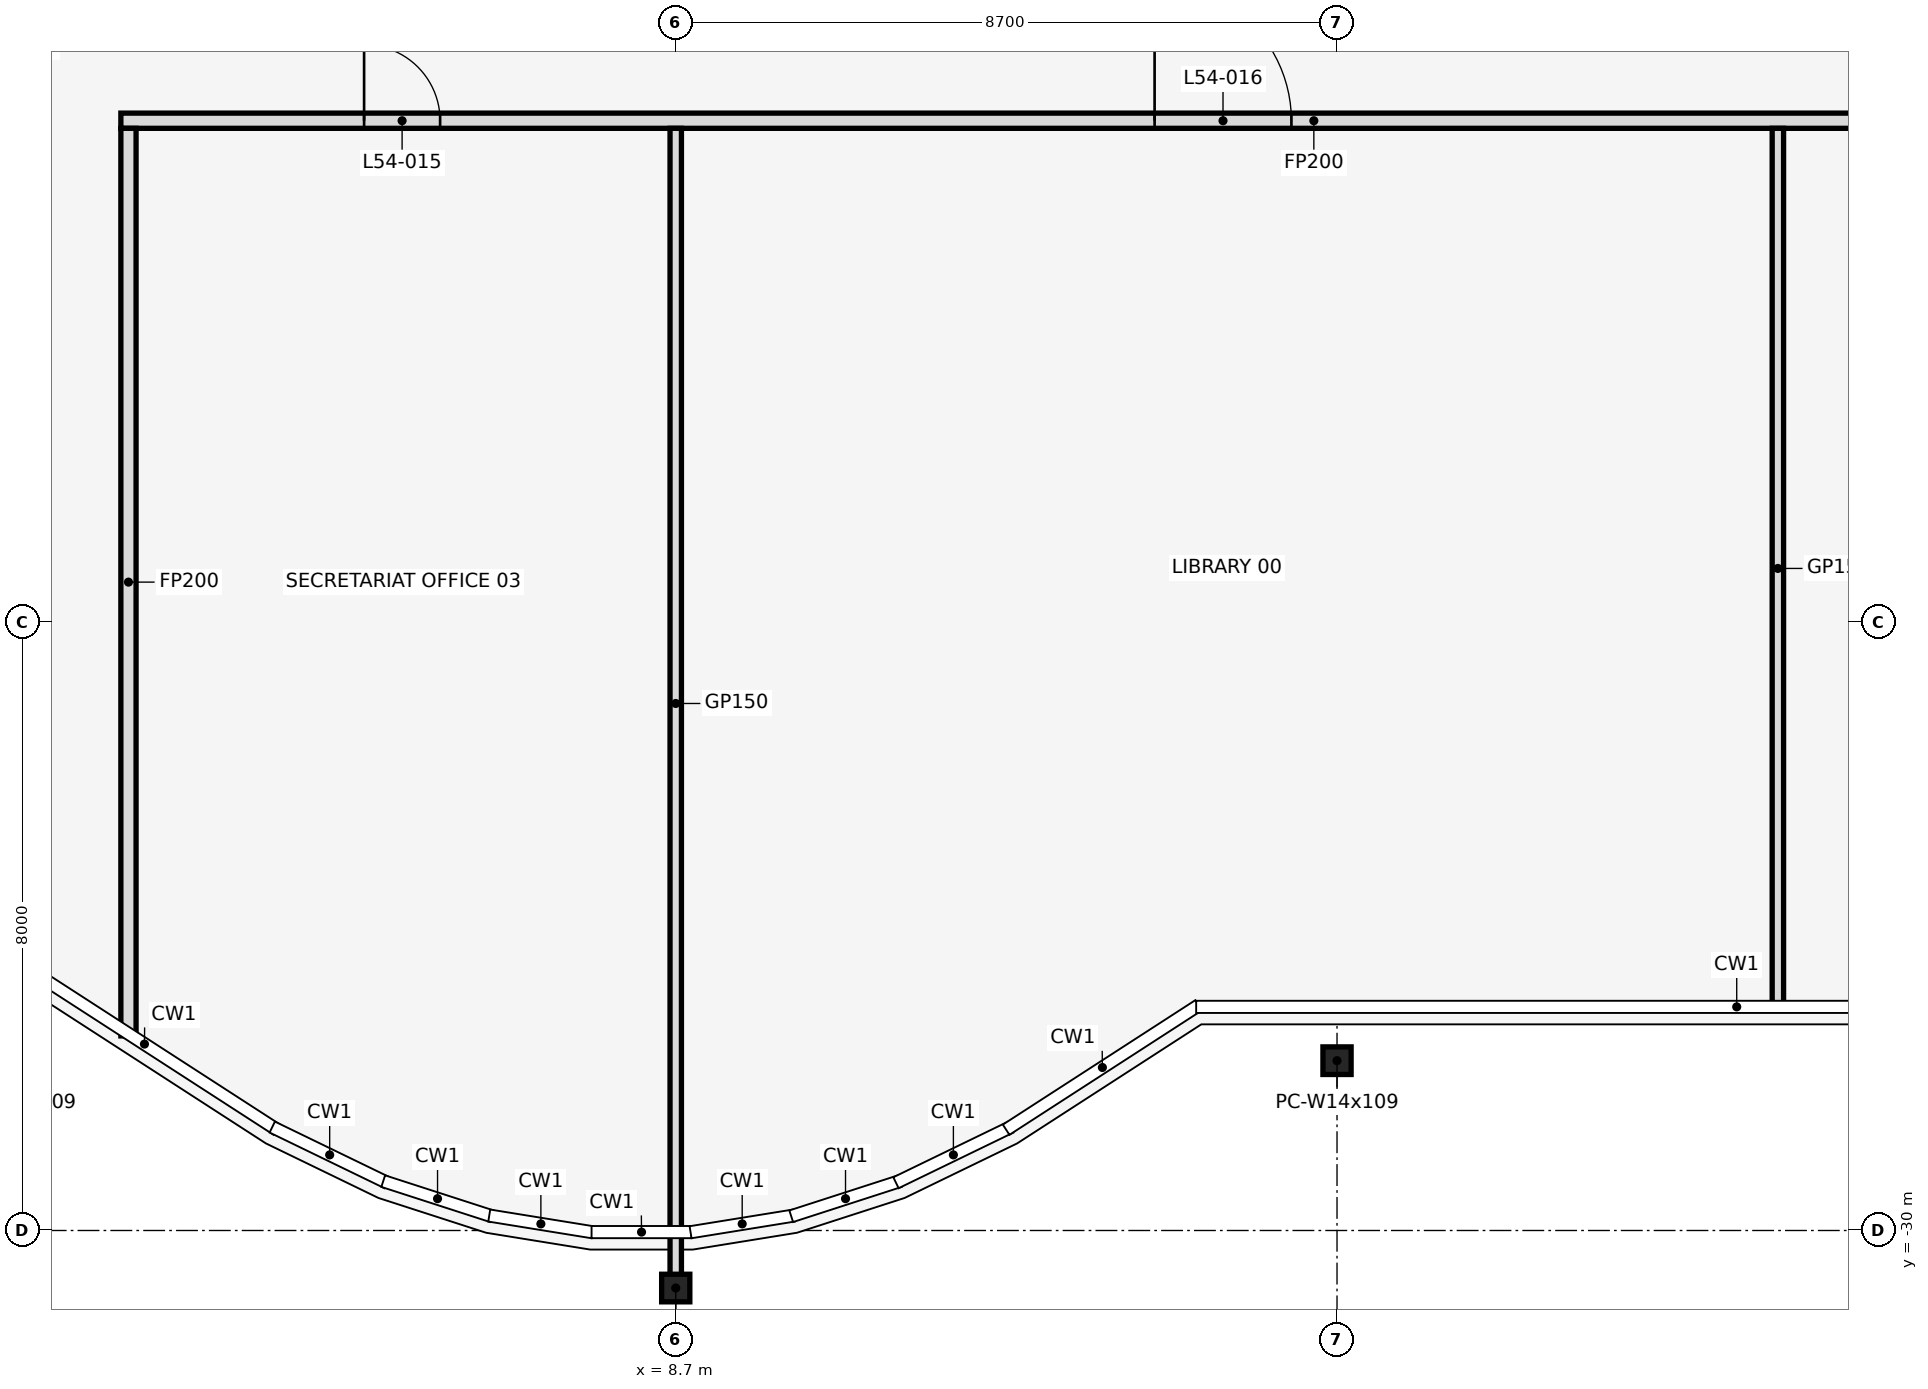
"""IFC4 building model, lengths in metres.
Left out: names, types, materials, properties, quantities, classifications, styles, units other than length and angle.
Written with IfcOpenShell. Run it as: python <this file> out.ifc"""

import sys

from ifc_helpers import new_model, si_unit, direction, frame, frame_2d, origin, origin_2d, place, context, subcontext, project, spatial, rectangle, i_section, extrude, element, fill, save


model = new_model("IFC4")
c1 = context("Model", 3, precision=1e-05, world=origin(), true_north=direction((0.0, 1.0)))
c2 = subcontext(c1, "Body", "Model", "MODEL_VIEW")
j1 = project(units=[si_unit("LENGTHUNIT", "METRE"), si_unit("PLANEANGLEUNIT", "RADIAN")], contexts=[c1])
p1 = place(None, origin())
s1 = spatial("IfcSite", under=j1, at=p1, CompositionType="ELEMENT")
p2 = place(p1, origin())
s2 = spatial("IfcBuilding", under=s1, at=p2, CompositionType="ELEMENT")
p3 = place(p2, frame((0.0, 0.0, 241.4)))
s3 = spatial("IfcBuildingStorey", under=s2, at=p3, CompositionType="ELEMENT", Elevation=241.4)
for number, where, z_axis, x_axis in (
    (1, (8.7, -30.757, 0.0), (0.0, 0.0, 1.0), (1.0, 0.0, 0.0)),
    (2, (17.4, -27.766, 0.0), (0.0, 0.0, 1.0), (1.0, 0.0, 0.0)),
):
    element("IfcColumn", number, at=place(p3, frame(where, z_axis=z_axis, x_axis=x_axis)), inside=s3, PredefinedType="COLUMN", context=c2, shape_type="SweptSolid", body=[
        extrude(i_section(OverallWidth=0.371, OverallDepth=0.363, WebThickness=0.013, FlangeThickness=0.022, at=origin_2d()), origin(), (0.0, 0.0, 1.0), 4.2),
    ])
p4 = place(p3, frame((1.4, -15.4, 0.0), z_axis=(0.0, 0.0, 1.0), x_axis=(1.0, 0.0, 0.0)))
e3 = element("IfcWall", 3, at=p4, inside=s3, PredefinedType="PARTITIONING", context=c2, shape_type="SweptSolid", body=[
    extrude(rectangle(XDim=31.39, YDim=0.2, at=frame_2d((15.695, 0.0))), origin(), (0.0, 0.0, 1.0), 3.118),
])
p5 = place(p4, frame((3.2, 0.0, 0.0)))
e4 = element("IfcOpeningElement", 4, at=p5, cuts=e3, PredefinedType="OPENING", context=c2, shape_type="SweptSolid", body=[
    extrude(rectangle(XDim=1.0, YDim=2.1, at=frame_2d((0.5, 1.05))), frame((0.0, 0.112, 0.0), z_axis=(0.0, -1.0, 0.0), x_axis=(1.0, 0.0, 0.0)), (0.0, 0.0, 1.0), 0.224),
])
p6 = place(p4, frame((13.6, 0.0, 0.0)))
e5 = element("IfcOpeningElement", 5, at=p6, cuts=e3, PredefinedType="OPENING", context=c2, shape_type="SweptSolid", body=[
    extrude(rectangle(XDim=1.8, YDim=2.1, at=frame_2d((0.9, 1.05))), frame((0.0, 0.112, 0.0), z_axis=(0.0, -1.0, 0.0), x_axis=(1.0, 0.0, 0.0)), (0.0, 0.0, 1.0), 0.224),
])
p7 = place(p4, frame((26.1, 0.0, 0.0)))
e6 = element("IfcOpeningElement", 6, at=p7, cuts=e3, PredefinedType="OPENING", context=c2, shape_type="SweptSolid", body=[
    extrude(rectangle(XDim=1.0, YDim=2.1, at=frame_2d((0.5, 1.05))), frame((0.0, 0.112, 0.0), z_axis=(0.0, -1.0, 0.0), x_axis=(1.0, 0.0, 0.0)), (0.0, 0.0, 1.0), 0.224),
])
p8 = place(p3, frame((1.5, -27.44, 0.0), z_axis=(0.0, 0.0, 1.0), x_axis=(0.0, 1.0, 0.0)))
e7 = element("IfcWall", 7, at=p8, inside=s3, PredefinedType="PARTITIONING", context=c2, shape_type="SweptSolid", body=[
    extrude(rectangle(XDim=11.94, YDim=0.2, at=frame_2d((5.97, 0.0))), origin(), (0.0, 0.0, 1.0), 3.118),
])
p9 = place(p3, frame((8.7, -30.633, 0.0), z_axis=(0.0, 0.0, 1.0), x_axis=(0.0, 1.0, 0.0)))
e8 = element("IfcWall", 8, at=p9, inside=s3, PredefinedType="PARTITIONING", context=c2, shape_type="SweptSolid", body=[
    extrude(rectangle(XDim=15.133, YDim=0.15, at=frame_2d((7.567, 0.0))), origin(), (0.0, 0.0, 1.0), 3.118),
])
p10 = place(p3, frame((23.2, -27.08, 0.0), z_axis=(0.0, 0.0, 1.0), x_axis=(0.0, 1.0, 0.0)))
e9 = element("IfcWall", 9, at=p10, inside=s3, PredefinedType="PARTITIONING", context=c2, shape_type="SweptSolid", body=[
    extrude(rectangle(XDim=11.58, YDim=0.15, at=frame_2d((5.79, 0.0))), origin(), (0.0, 0.0, 1.0), 3.118),
])
p11 = place(p5, frame((1.0, 0.0, 0.0), z_axis=(0.0, 0.0, 1.0), x_axis=(-1.0, 0.0, 0.0)))
e10 = element("IfcDoor", 10, at=p11, inside=s3, OperationType="SINGLE_SWING_RIGHT", PredefinedType="DOOR", context=c2, shape_type="SweptSolid", body=[
    extrude(rectangle(XDim=1.0, YDim=2.1, at=frame_2d((0.5, 1.05))), frame((0.0, 0.025, 0.0), z_axis=(0.0, -1.0, 0.0), x_axis=(1.0, 0.0, 0.0)), (0.0, 0.0, 1.0), 0.05),
])
fill(e4, e10)
p12 = place(p6, origin())
e11 = element("IfcDoor", 11, at=p12, inside=s3, OperationType="SINGLE_SWING_LEFT", PredefinedType="DOOR", context=c2, shape_type="SweptSolid", body=[
    extrude(rectangle(XDim=1.8, YDim=2.1, at=frame_2d((0.9, 1.05))), frame((0.0, 0.025, 0.0), z_axis=(0.0, -1.0, 0.0), x_axis=(1.0, 0.0, 0.0)), (0.0, 0.0, 1.0), 0.05),
])
fill(e5, e11)
save(model, sys.argv[1])
